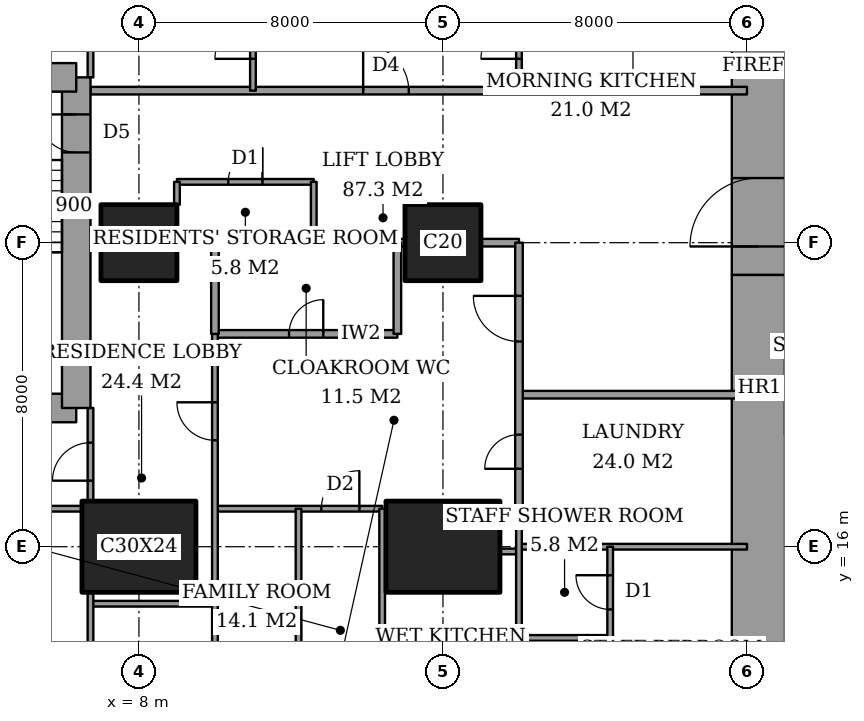
"""IFC4 building model, lengths in metres.
Left out: names, types, materials, properties, quantities, classifications, styles, units other than length and angle.
Written with IfcOpenShell. Run it as: python <this file> out.ifc"""

import sys

from ifc_helpers import new_model, si_unit, direction, frame, frame_2d, origin, origin_2d, place, context, subcontext, project, spatial, rectangle, extrude, element, fill, save


model = new_model("IFC4")
c1 = context("Model", 3, precision=1e-05, world=origin(), true_north=direction((0.0, 1.0)))
c2 = subcontext(c1, "Body", "Model", "MODEL_VIEW")
j1 = project(units=[si_unit("LENGTHUNIT", "METRE"), si_unit("PLANEANGLEUNIT", "RADIAN")], contexts=[c1])
p1 = place(None, origin())
s1 = spatial("IfcSite", under=j1, at=p1, CompositionType="ELEMENT")
p2 = place(p1, origin())
s2 = spatial("IfcBuilding", under=s1, at=p2, CompositionType="ELEMENT")
p3 = place(p2, frame((0.0, 0.0, 125.0)))
s3 = spatial("IfcBuildingStorey", under=s2, at=p3, CompositionType="ELEMENT", Elevation=125.0)
p4 = place(p3, frame((8.0, 16.0, 0.0), z_axis=(0.0, 0.0, 1.0), x_axis=(1.0, 0.0, 0.0)))
e1 = element("IfcColumn", 1, at=p4, inside=s3, PredefinedType="COLUMN", context=c2, shape_type="SweptSolid", body=[
    extrude(rectangle(XDim=3.0, YDim=2.4, at=origin_2d()), origin(), (0.0, 0.0, 1.0), 3.6),
])
p5 = place(p3, frame((8.0, 24.0, 0.0), z_axis=(0.0, 0.0, 1.0), x_axis=(1.0, 0.0, 0.0)))
e2 = element("IfcColumn", 2, at=p5, inside=s3, PredefinedType="COLUMN", context=c2, shape_type="SweptSolid", body=[
    extrude(rectangle(XDim=2.0, YDim=2.0, at=origin_2d()), origin(), (0.0, 0.0, 1.0), 3.6),
])
p6 = place(p3, frame((16.0, 16.0, 0.0), z_axis=(0.0, 0.0, 1.0), x_axis=(1.0, 0.0, 0.0)))
e3 = element("IfcColumn", 3, at=p6, inside=s3, PredefinedType="COLUMN", context=c2, shape_type="SweptSolid", body=[
    extrude(rectangle(XDim=3.0, YDim=2.4, at=origin_2d()), origin(), (0.0, 0.0, 1.0), 3.6),
])
p7 = place(p3, frame((16.0, 24.0, 0.0), z_axis=(0.0, 0.0, 1.0), x_axis=(1.0, 0.0, 0.0)))
e4 = element("IfcColumn", 4, at=p7, inside=s3, PredefinedType="COLUMN", context=c2, shape_type="SweptSolid", body=[
    extrude(rectangle(XDim=2.0, YDim=2.0, at=origin_2d()), origin(), (0.0, 0.0, 1.0), 3.6),
])
p8 = place(p3, frame((24.3, 13.0, 0.0), z_axis=(0.0, 0.0, 1.0), x_axis=(0.0, 1.0, 0.0)))
e5 = element("IfcWall", 5, at=p8, inside=s3, PredefinedType="SHEAR", context=c2, shape_type="SweptSolid", body=[
    extrude(rectangle(XDim=10.15, YDim=1.4, at=frame_2d((5.075, 0.0))), origin(), (0.0, 0.0, 1.0), 3.6),
])
p9 = place(p3, frame((24.3, 23.15, 0.0), z_axis=(0.0, 0.0, 1.0), x_axis=(0.0, 1.0, 0.0)))
e6 = element("IfcWall", 6, at=p9, inside=s3, PredefinedType="SHEAR", context=c2, shape_type="SweptSolid", body=[
    extrude(rectangle(XDim=11.85, YDim=1.4, at=frame_2d((5.925, 0.0))), origin(), (0.0, 0.0, 1.0), 3.6),
])
p10 = place(p9, frame((0.75, 0.0, 0.0)))
e7 = element("IfcOpeningElement", 7, at=p10, cuts=e6, PredefinedType="OPENING", context=c2, shape_type="SweptSolid", body=[
    extrude(rectangle(XDim=1.8, YDim=2.4, at=frame_2d((0.9, 1.2))), frame((0.0, 0.71, 0.0), z_axis=(0.0, -1.0, 0.0), x_axis=(1.0, 0.0, 0.0)), (0.0, 0.0, 1.0), 1.42),
])
p11 = place(p3, frame((1.9, 19.65, 0.0), z_axis=(0.0, 0.0, 1.0), x_axis=(1.0, 0.0, 0.0)))
e8 = element("IfcWall", 8, at=p11, inside=s3, PredefinedType="SHEAR", context=c2, shape_type="SweptSolid", body=[
    extrude(rectangle(XDim=4.45, YDim=0.75, at=frame_2d((2.225, 0.0))), origin(), (0.0, 0.0, 1.0), 3.6),
])
p12 = place(p3, frame((6.35, 19.65, 0.0), z_axis=(0.0, 0.0, 1.0), x_axis=(0.0, 1.0, 0.0)))
e9 = element("IfcWall", 9, at=p12, inside=s3, PredefinedType="SHEAR", context=c2, shape_type="SweptSolid", body=[
    extrude(rectangle(XDim=8.7, YDim=0.75, at=frame_2d((4.35, 0.0))), origin(), (0.0, 0.0, 1.0), 3.6),
])
p13 = place(p12, frame((6.725, 0.0, 0.0)))
e10 = element("IfcOpeningElement", 10, at=p13, cuts=e9, PredefinedType="OPENING", context=c2, shape_type="SweptSolid", body=[
    extrude(rectangle(XDim=1.0, YDim=2.1, at=frame_2d((0.5, 1.05))), frame((0.0, 0.385, 0.0), z_axis=(0.0, -1.0, 0.0), x_axis=(1.0, 0.0, 0.0)), (0.0, 0.0, 1.0), 0.77),
])
p14 = place(p3, frame((6.35, 28.35, 0.0), z_axis=(0.0, 0.0, 1.0), x_axis=(-1.0, 0.0, 0.0)))
e11 = element("IfcWall", 11, at=p14, inside=s3, PredefinedType="SHEAR", context=c2, shape_type="SweptSolid", body=[
    extrude(rectangle(XDim=4.45, YDim=0.75, at=frame_2d((2.225, 0.0))), origin(), (0.0, 0.0, 1.0), 3.6),
])
p15 = place(p3, frame((18.0, 13.6, 0.0), z_axis=(0.0, 0.0, 1.0), x_axis=(1.0, 0.0, 0.0)))
e12 = element("IfcWall", 12, at=p15, inside=s3, PredefinedType="PARTITIONING", context=c2, shape_type="SweptSolid", body=[
    extrude(rectangle(XDim=2.4, YDim=0.15, at=frame_2d((1.2, 0.0))), origin(), (0.0, 0.0, 1.0), 3.35),
])
p16 = place(p3, frame((6.725, 14.5, 0.0), z_axis=(0.0, 0.0, 1.0), x_axis=(1.0, 0.0, 0.0)))
e13 = element("IfcWall", 13, at=p16, inside=s3, PredefinedType="PARTITIONING", context=c2, shape_type="SweptSolid", body=[
    extrude(rectangle(XDim=3.275, YDim=0.15, at=frame_2d((1.637, 0.0))), origin(), (0.0, 0.0, 1.0), 3.35),
])
p17 = place(p3, frame((17.5, 15.875, 0.0), z_axis=(0.0, 0.0, 1.0), x_axis=(1.0, 0.0, 0.0)))
e14 = element("IfcWall", 14, at=p17, inside=s3, PredefinedType="PARTITIONING", context=c2, shape_type="SweptSolid", body=[
    extrude(rectangle(XDim=0.5, YDim=0.15, at=frame_2d((0.25, 0.0))), origin(), (0.0, 0.0, 1.0), 2.634),
])
p18 = place(p3, frame((18.0, 16.0, 0.0), z_axis=(0.0, 0.0, 1.0), x_axis=(1.0, 0.0, 0.0)))
e15 = element("IfcWall", 15, at=p18, inside=s3, PredefinedType="PARTITIONING", context=c2, shape_type="SweptSolid", body=[
    extrude(rectangle(XDim=6.0, YDim=0.15, at=frame_2d((3.0, 0.0))), origin(), (0.0, 0.0, 1.0), 2.634),
])
p19 = place(p3, frame((1.35, 17.0, 0.0), z_axis=(0.0, 0.0, 1.0), x_axis=(1.0, 0.0, 0.0)))
e16 = element("IfcWall", 16, at=p19, inside=s3, PredefinedType="PARTITIONING", context=c2, shape_type="SweptSolid", body=[
    extrude(rectangle(XDim=5.15, YDim=0.15, at=frame_2d((2.575, 0.0))), origin(), (0.0, 0.0, 1.0), 3.35),
])
p20 = place(p3, frame((10.0, 17.0, 0.0), z_axis=(0.0, 0.0, 1.0), x_axis=(1.0, 0.0, 0.0)))
e17 = element("IfcWall", 17, at=p20, inside=s3, PredefinedType="PARTITIONING", context=c2, shape_type="SweptSolid", body=[
    extrude(rectangle(XDim=4.4, YDim=0.15, at=frame_2d((2.2, 0.0))), origin(), (0.0, 0.0, 1.0), 3.35),
])
p21 = place(p20, frame((2.8, 0.0, 0.0)))
e18 = element("IfcOpeningElement", 18, at=p21, cuts=e17, PredefinedType="OPENING", context=c2, shape_type="SweptSolid", body=[
    extrude(rectangle(XDim=1.0, YDim=2.1, at=frame_2d((0.5, 1.05))), frame((0.0, 0.085, 0.0), z_axis=(0.0, -1.0, 0.0), x_axis=(1.0, 0.0, 0.0)), (0.0, 0.0, 1.0), 0.17),
])
p22 = place(p3, frame((18.0, 20.0, 0.0), z_axis=(0.0, 0.0, 1.0), x_axis=(1.0, 0.0, 0.0)))
e19 = element("IfcWall", 19, at=p22, inside=s3, PredefinedType="PARTITIONING", context=c2, shape_type="SweptSolid", body=[
    extrude(rectangle(XDim=6.0, YDim=0.2, at=frame_2d((3.0, 0.0))), origin(), (0.0, 0.0, 1.0), 3.35),
])
p23 = place(p3, frame((10.0, 21.6, 0.0), z_axis=(0.0, 0.0, 1.0), x_axis=(1.0, 0.0, 0.0)))
e20 = element("IfcWall", 20, at=p23, inside=s3, PredefinedType="PARTITIONING", context=c2, shape_type="SweptSolid", body=[
    extrude(rectangle(XDim=4.8, YDim=0.2, at=frame_2d((2.4, 0.0))), origin(), (0.0, 0.0, 1.0), 3.35),
])
p24 = place(p23, frame((1.95, 0.0, 0.0)))
e21 = element("IfcOpeningElement", 21, at=p24, cuts=e20, PredefinedType="OPENING", context=c2, shape_type="SweptSolid", body=[
    extrude(rectangle(XDim=0.9, YDim=2.1, at=frame_2d((0.45, 1.05))), frame((0.0, 0.11, 0.0), z_axis=(0.0, -1.0, 0.0), x_axis=(1.0, 0.0, 0.0)), (0.0, 0.0, 1.0), 0.22),
])
p25 = place(p3, frame((9.0, 24.0, 0.0), z_axis=(0.0, 0.0, 1.0), x_axis=(1.0, 0.0, 0.0)))
e22 = element("IfcWall", 22, at=p25, inside=s3, PredefinedType="PARTITIONING", context=c2, shape_type="SweptSolid", body=[
    extrude(rectangle(XDim=6.0, YDim=0.2, at=frame_2d((3.0, 0.0))), origin(), (0.0, 0.0, 1.0), 3.35),
])
p26 = place(p3, frame((17.0, 24.0, 0.0), z_axis=(0.0, 0.0, 1.0), x_axis=(1.0, 0.0, 0.0)))
e23 = element("IfcWall", 23, at=p26, inside=s3, PredefinedType="PARTITIONING", context=c2, shape_type="SweptSolid", body=[
    extrude(rectangle(XDim=1.0, YDim=0.2, at=frame_2d((0.5, 0.0))), origin(), (0.0, 0.0, 1.0), 3.35),
])
p27 = place(p3, frame((9.0, 25.6, 0.0), z_axis=(0.0, 0.0, 1.0), x_axis=(1.0, 0.0, 0.0)))
e24 = element("IfcWall", 24, at=p27, inside=s3, PredefinedType="PARTITIONING", context=c2, shape_type="SweptSolid", body=[
    extrude(rectangle(XDim=3.6, YDim=0.15, at=frame_2d((1.8, 0.0))), origin(), (0.0, 0.0, 1.0), 3.35),
])
p28 = place(p27, frame((1.35, 0.0, 0.0)))
e25 = element("IfcOpeningElement", 25, at=p28, cuts=e24, PredefinedType="OPENING", context=c2, shape_type="SweptSolid", body=[
    extrude(rectangle(XDim=0.9, YDim=2.1, at=frame_2d((0.45, 1.05))), frame((0.0, 0.085, 0.0), z_axis=(0.0, -1.0, 0.0), x_axis=(1.0, 0.0, 0.0)), (0.0, 0.0, 1.0), 0.17),
])
p29 = place(p3, frame((6.725, 28.0, 0.0), z_axis=(0.0, 0.0, 1.0), x_axis=(1.0, 0.0, 0.0)))
e26 = element("IfcWall", 26, at=p29, inside=s3, PredefinedType="PARTITIONING", context=c2, shape_type="SweptSolid", body=[
    extrude(rectangle(XDim=17.275, YDim=0.2, at=frame_2d((8.637, 0.0))), origin(), (0.0, 0.0, 1.0), 3.35),
])
p30 = place(p29, frame((7.175, 0.0, 0.0)))
e27 = element("IfcOpeningElement", 27, at=p30, cuts=e26, PredefinedType="OPENING", context=c2, shape_type="SweptSolid", body=[
    extrude(rectangle(XDim=1.2, YDim=2.4, at=frame_2d((0.6, 1.2))), frame((0.0, 0.11, 0.0), z_axis=(0.0, -1.0, 0.0), x_axis=(1.0, 0.0, 0.0)), (0.0, 0.0, 1.0), 0.22),
])
p31 = place(p3, frame((6.725, 10.6, 0.0), z_axis=(0.0, 0.0, 1.0), x_axis=(0.0, 1.0, 0.0)))
e28 = element("IfcWall", 28, at=p31, inside=s3, PredefinedType="PARTITIONING", context=c2, shape_type="SweptSolid", body=[
    extrude(rectangle(XDim=4.2, YDim=0.15, at=frame_2d((2.1, 0.0))), origin(), (0.0, 0.0, 1.0), 3.35),
])
p32 = place(p3, frame((6.725, 17.2, 0.0), z_axis=(0.0, 0.0, 1.0), x_axis=(0.0, 1.0, 0.0)))
e29 = element("IfcWall", 29, at=p32, inside=s3, PredefinedType="PARTITIONING", context=c2, shape_type="SweptSolid", body=[
    extrude(rectangle(XDim=2.45, YDim=0.15, at=frame_2d((1.225, 0.0))), origin(), (0.0, 0.0, 1.0), 3.35),
])
p33 = place(p32, frame((0.538, 0.0, 0.0)))
e30 = element("IfcOpeningElement", 30, at=p33, cuts=e29, PredefinedType="OPENING", context=c2, shape_type="SweptSolid", body=[
    extrude(rectangle(XDim=1.0, YDim=2.1, at=frame_2d((0.5, 1.05))), frame((0.0, 0.085, 0.0), z_axis=(0.0, -1.0, 0.0), x_axis=(1.0, 0.0, 0.0)), (0.0, 0.0, 1.0), 0.17),
])
p34 = place(p3, frame((6.725, 28.35, 0.0), z_axis=(0.0, 0.0, 1.0), x_axis=(0.0, 1.0, 0.0)))
e31 = element("IfcWall", 31, at=p34, inside=s3, PredefinedType="PARTITIONING", context=c2, shape_type="SweptSolid", body=[
    extrude(rectangle(XDim=2.45, YDim=0.15, at=frame_2d((1.225, 0.0))), origin(), (0.0, 0.0, 1.0), 3.35),
])
p35 = place(p34, frame((0.913, 0.0, 0.0)))
e32 = element("IfcOpeningElement", 32, at=p35, cuts=e31, PredefinedType="OPENING", context=c2, shape_type="SweptSolid", body=[
    extrude(rectangle(XDim=1.0, YDim=2.1, at=frame_2d((0.5, 1.05))), frame((0.0, 0.085, 0.0), z_axis=(0.0, -1.0, 0.0), x_axis=(1.0, 0.0, 0.0)), (0.0, 0.0, 1.0), 0.17),
])
p36 = place(p3, frame((9.0, 25.0, 0.0), z_axis=(0.0, 0.0, 1.0), x_axis=(0.0, 1.0, 0.0)))
e33 = element("IfcWall", 33, at=p36, inside=s3, PredefinedType="PARTITIONING", context=c2, shape_type="SweptSolid", body=[
    extrude(rectangle(XDim=0.6, YDim=0.15, at=frame_2d((0.3, 0.0))), origin(), (0.0, 0.0, 1.0), 3.35),
])
p37 = place(p3, frame((10.0, 21.6, 0.0), z_axis=(0.0, 0.0, 1.0), x_axis=(0.0, 1.0, 0.0)))
e34 = element("IfcWall", 34, at=p37, inside=s3, PredefinedType="PARTITIONING", context=c2, shape_type="SweptSolid", body=[
    extrude(rectangle(XDim=2.4, YDim=0.2, at=frame_2d((1.2, 0.0))), origin(), (0.0, 0.0, 1.0), 3.35),
])
p38 = place(p3, frame((10.0, 10.6, 0.0), z_axis=(0.0, 0.0, 1.0), x_axis=(0.0, 1.0, 0.0)))
e35 = element("IfcWall", 35, at=p38, inside=s3, PredefinedType="PARTITIONING", context=c2, shape_type="SweptSolid", body=[
    extrude(rectangle(XDim=11.0, YDim=0.15, at=frame_2d((5.5, 0.0))), origin(), (0.0, 0.0, 1.0), 3.35),
])
p39 = place(p38, frame((8.2, 0.0, 0.0)))
e36 = element("IfcOpeningElement", 36, at=p39, cuts=e35, PredefinedType="OPENING", context=c2, shape_type="SweptSolid", body=[
    extrude(rectangle(XDim=1.0, YDim=2.1, at=frame_2d((0.5, 1.05))), frame((0.0, 0.085, 0.0), z_axis=(0.0, -1.0, 0.0), x_axis=(1.0, 0.0, 0.0)), (0.0, 0.0, 1.0), 0.17),
])
p40 = place(p3, frame((11.0, 28.0, 0.0), z_axis=(0.0, 0.0, 1.0), x_axis=(0.0, 1.0, 0.0)))
e37 = element("IfcWall", 37, at=p40, inside=s3, PredefinedType="PARTITIONING", context=c2, shape_type="SweptSolid", body=[
    extrude(rectangle(XDim=9.2, YDim=0.15, at=frame_2d((4.6, 0.0))), origin(), (0.0, 0.0, 1.0), 3.35),
])
p41 = place(p40, frame((0.837, 0.0, 0.0)))
e38 = element("IfcOpeningElement", 38, at=p41, cuts=e37, PredefinedType="OPENING", context=c2, shape_type="SweptSolid", body=[
    extrude(rectangle(XDim=1.0, YDim=2.1, at=frame_2d((0.5, 1.05))), frame((0.0, 0.085, 0.0), z_axis=(0.0, -1.0, 0.0), x_axis=(1.0, 0.0, 0.0)), (0.0, 0.0, 1.0), 0.17),
])
p42 = place(p3, frame((12.2, 10.6, 0.0), z_axis=(0.0, 0.0, 1.0), x_axis=(0.0, 1.0, 0.0)))
e39 = element("IfcWall", 39, at=p42, inside=s3, PredefinedType="PARTITIONING", context=c2, shape_type="SweptSolid", body=[
    extrude(rectangle(XDim=6.4, YDim=0.15, at=frame_2d((3.2, 0.0))), origin(), (0.0, 0.0, 1.0), 3.35),
])
p43 = place(p3, frame((12.6, 24.0, 0.0), z_axis=(0.0, 0.0, 1.0), x_axis=(0.0, 1.0, 0.0)))
e40 = element("IfcWall", 40, at=p43, inside=s3, PredefinedType="PARTITIONING", context=c2, shape_type="SweptSolid", body=[
    extrude(rectangle(XDim=1.6, YDim=0.15, at=frame_2d((0.8, 0.0))), origin(), (0.0, 0.0, 1.0), 3.35),
])
p44 = place(p3, frame((14.4, 10.6, 0.0), z_axis=(0.0, 0.0, 1.0), x_axis=(0.0, 1.0, 0.0)))
e41 = element("IfcWall", 41, at=p44, inside=s3, PredefinedType="PARTITIONING", context=c2, shape_type="SweptSolid", body=[
    extrude(rectangle(XDim=6.4, YDim=0.15, at=frame_2d((3.2, 0.0))), origin(), (0.0, 0.0, 1.0), 3.35),
])
p45 = place(p3, frame((14.8, 21.6, 0.0), z_axis=(0.0, 0.0, 1.0), x_axis=(0.0, 1.0, 0.0)))
e42 = element("IfcWall", 42, at=p45, inside=s3, PredefinedType="PARTITIONING", context=c2, shape_type="SweptSolid", body=[
    extrude(rectangle(XDim=2.4, YDim=0.2, at=frame_2d((1.2, 0.0))), origin(), (0.0, 0.0, 1.0), 3.35),
])
p46 = place(p3, frame((18.0, 17.0, 0.0), z_axis=(0.0, 0.0, 1.0), x_axis=(0.0, 1.0, 0.0)))
e43 = element("IfcWall", 43, at=p46, inside=s3, PredefinedType="PARTITIONING", context=c2, shape_type="SweptSolid", body=[
    extrude(rectangle(XDim=7.0, YDim=0.2, at=frame_2d((3.5, 0.0))), origin(), (0.0, 0.0, 1.0), 3.35),
])
p47 = place(p46, frame((4.4, 0.0, 0.0)))
e44 = element("IfcOpeningElement", 44, at=p47, cuts=e43, PredefinedType="OPENING", context=c2, shape_type="SweptSolid", body=[
    extrude(rectangle(XDim=1.2, YDim=2.4, at=frame_2d((0.6, 1.2))), frame((0.0, 0.11, 0.0), z_axis=(0.0, -1.0, 0.0), x_axis=(1.0, 0.0, 0.0)), (0.0, 0.0, 1.0), 0.22),
])
p48 = place(p46, frame((1.05, 0.0, 0.0)))
e45 = element("IfcOpeningElement", 45, at=p48, cuts=e43, PredefinedType="OPENING", context=c2, shape_type="SweptSolid", body=[
    extrude(rectangle(XDim=0.9, YDim=2.1, at=frame_2d((0.45, 1.05))), frame((0.0, 0.11, 0.0), z_axis=(0.0, -1.0, 0.0), x_axis=(1.0, 0.0, 0.0)), (0.0, 0.0, 1.0), 0.22),
])
p49 = place(p3, frame((18.0, 10.6, 0.0), z_axis=(0.0, 0.0, 1.0), x_axis=(0.0, 1.0, 0.0)))
e46 = element("IfcWall", 46, at=p49, inside=s3, PredefinedType="PARTITIONING", context=c2, shape_type="SweptSolid", body=[
    extrude(rectangle(XDim=6.4, YDim=0.15, at=frame_2d((3.2, 0.0))), origin(), (0.0, 0.0, 1.0), 3.35),
])
p50 = place(p3, frame((18.0, 28.0, 0.0), z_axis=(0.0, 0.0, 1.0), x_axis=(0.0, 1.0, 0.0)))
e47 = element("IfcWall", 47, at=p50, inside=s3, PredefinedType="PARTITIONING", context=c2, shape_type="SweptSolid", body=[
    extrude(rectangle(XDim=9.2, YDim=0.15, at=frame_2d((4.6, 0.0))), origin(), (0.0, 0.0, 1.0), 3.35),
])
p51 = place(p50, frame((0.837, 0.0, 0.0)))
e48 = element("IfcOpeningElement", 48, at=p51, cuts=e47, PredefinedType="OPENING", context=c2, shape_type="SweptSolid", body=[
    extrude(rectangle(XDim=1.0, YDim=2.1, at=frame_2d((0.5, 1.05))), frame((0.0, 0.085, 0.0), z_axis=(0.0, -1.0, 0.0), x_axis=(1.0, 0.0, 0.0)), (0.0, 0.0, 1.0), 0.17),
])
p52 = place(p3, frame((20.4, 13.6, 0.0), z_axis=(0.0, 0.0, 1.0), x_axis=(0.0, 1.0, 0.0)))
e49 = element("IfcWall", 49, at=p52, inside=s3, PredefinedType="PARTITIONING", context=c2, shape_type="SweptSolid", body=[
    extrude(rectangle(XDim=2.4, YDim=0.15, at=frame_2d((1.2, 0.0))), origin(), (0.0, 0.0, 1.0), 3.35),
])
p53 = place(p52, frame((0.75, 0.0, 0.0)))
e50 = element("IfcOpeningElement", 50, at=p53, cuts=e49, PredefinedType="OPENING", context=c2, shape_type="SweptSolid", body=[
    extrude(rectangle(XDim=0.9, YDim=2.1, at=frame_2d((0.45, 1.05))), frame((0.0, 0.085, 0.0), z_axis=(0.0, -1.0, 0.0), x_axis=(1.0, 0.0, 0.0)), (0.0, 0.0, 1.0), 0.17),
])
p54 = place(p33, origin())
e51 = element("IfcDoor", 51, at=p54, inside=s3, OperationType="SINGLE_SWING_RIGHT", PredefinedType="DOOR", context=c2, shape_type="SweptSolid", body=[
    extrude(rectangle(XDim=1.0, YDim=2.1, at=frame_2d((0.5, 1.05))), frame((0.0, 0.025, 0.0), z_axis=(0.0, -1.0, 0.0), x_axis=(1.0, 0.0, 0.0)), (0.0, 0.0, 1.0), 0.05),
])
fill(e30, e51)
p55 = place(p39, origin())
e52 = element("IfcDoor", 52, at=p55, inside=s3, OperationType="SINGLE_SWING_LEFT", PredefinedType="DOOR", context=c2, shape_type="SweptSolid", body=[
    extrude(rectangle(XDim=1.0, YDim=2.1, at=frame_2d((0.5, 1.05))), frame((0.0, 0.025, 0.0), z_axis=(0.0, -1.0, 0.0), x_axis=(1.0, 0.0, 0.0)), (0.0, 0.0, 1.0), 0.05),
])
fill(e36, e52)
p56 = place(p24, origin())
e53 = element("IfcDoor", 53, at=p56, inside=s3, OperationType="SINGLE_SWING_LEFT", PredefinedType="DOOR", context=c2, shape_type="SweptSolid", body=[
    extrude(rectangle(XDim=0.9, YDim=2.1, at=frame_2d((0.45, 1.05))), frame((0.0, 0.025, 0.0), z_axis=(0.0, -1.0, 0.0), x_axis=(1.0, 0.0, 0.0)), (0.0, 0.0, 1.0), 0.05),
])
fill(e21, e53)
p57 = place(p47, origin())
e54 = element("IfcDoor", 54, at=p57, inside=s3, OperationType="SINGLE_SWING_LEFT", PredefinedType="DOOR", context=c2, shape_type="SweptSolid", body=[
    extrude(rectangle(XDim=1.2, YDim=2.4, at=frame_2d((0.6, 1.2))), frame((0.0, 0.025, 0.0), z_axis=(0.0, -1.0, 0.0), x_axis=(1.0, 0.0, 0.0)), (0.0, 0.0, 1.0), 0.05),
])
fill(e44, e54)
p58 = place(p21, origin())
e55 = element("IfcDoor", 55, at=p58, inside=s3, OperationType="SINGLE_SWING_LEFT", PredefinedType="DOOR", context=c2, shape_type="SweptSolid", body=[
    extrude(rectangle(XDim=1.0, YDim=2.1, at=frame_2d((0.5, 1.05))), frame((0.0, 0.025, 0.0), z_axis=(0.0, -1.0, 0.0), x_axis=(1.0, 0.0, 0.0)), (0.0, 0.0, 1.0), 0.05),
])
fill(e18, e55)
p59 = place(p53, origin())
e56 = element("IfcDoor", 56, at=p59, inside=s3, OperationType="SINGLE_SWING_LEFT", PredefinedType="DOOR", context=c2, shape_type="SweptSolid", body=[
    extrude(rectangle(XDim=0.9, YDim=2.1, at=frame_2d((0.45, 1.05))), frame((0.0, 0.025, 0.0), z_axis=(0.0, -1.0, 0.0), x_axis=(1.0, 0.0, 0.0)), (0.0, 0.0, 1.0), 0.05),
])
fill(e50, e56)
p60 = place(p48, origin())
e57 = element("IfcDoor", 57, at=p60, inside=s3, OperationType="SINGLE_SWING_RIGHT", PredefinedType="DOOR", context=c2, shape_type="SweptSolid", body=[
    extrude(rectangle(XDim=0.9, YDim=2.1, at=frame_2d((0.45, 1.05))), frame((0.0, 0.025, 0.0), z_axis=(0.0, -1.0, 0.0), x_axis=(1.0, 0.0, 0.0)), (0.0, 0.0, 1.0), 0.05),
])
fill(e45, e57)
p61 = place(p41, origin())
e58 = element("IfcDoor", 58, at=p61, inside=s3, OperationType="SINGLE_SWING_RIGHT", PredefinedType="DOOR", context=c2, shape_type="SweptSolid", body=[
    extrude(rectangle(XDim=1.0, YDim=2.1, at=frame_2d((0.5, 1.05))), frame((0.0, 0.025, 0.0), z_axis=(0.0, -1.0, 0.0), x_axis=(1.0, 0.0, 0.0)), (0.0, 0.0, 1.0), 0.05),
])
fill(e38, e58)
p62 = place(p30, origin())
e59 = element("IfcDoor", 59, at=p62, inside=s3, OperationType="SINGLE_SWING_RIGHT", PredefinedType="DOOR", context=c2, shape_type="SweptSolid", body=[
    extrude(rectangle(XDim=1.2, YDim=2.4, at=frame_2d((0.6, 1.2))), frame((0.0, 0.025, 0.0), z_axis=(0.0, -1.0, 0.0), x_axis=(1.0, 0.0, 0.0)), (0.0, 0.0, 1.0), 0.05),
])
fill(e27, e59)
p63 = place(p51, origin())
e60 = element("IfcDoor", 60, at=p63, inside=s3, OperationType="SINGLE_SWING_RIGHT", PredefinedType="DOOR", context=c2, shape_type="SweptSolid", body=[
    extrude(rectangle(XDim=1.0, YDim=2.1, at=frame_2d((0.5, 1.05))), frame((0.0, 0.025, 0.0), z_axis=(0.0, -1.0, 0.0), x_axis=(1.0, 0.0, 0.0)), (0.0, 0.0, 1.0), 0.05),
])
fill(e48, e60)
p64 = place(p28, origin())
e61 = element("IfcDoor", 61, at=p64, inside=s3, OperationType="SINGLE_SWING_LEFT", PredefinedType="DOOR", context=c2, shape_type="SweptSolid", body=[
    extrude(rectangle(XDim=0.9, YDim=2.1, at=frame_2d((0.45, 1.05))), frame((0.0, 0.025, 0.0), z_axis=(0.0, -1.0, 0.0), x_axis=(1.0, 0.0, 0.0)), (0.0, 0.0, 1.0), 0.05),
])
fill(e25, e61)
p65 = place(p10, origin())
e62 = element("IfcDoor", 62, at=p65, inside=s3, OperationType="DOUBLE_DOOR_DOUBLE_SWING", PredefinedType="DOOR", context=c2, shape_type="SweptSolid", body=[
    extrude(rectangle(XDim=1.8, YDim=2.4, at=frame_2d((0.9, 1.2))), frame((0.0, 0.025, 0.0), z_axis=(0.0, -1.0, 0.0), x_axis=(1.0, 0.0, 0.0)), (0.0, 0.0, 1.0), 0.05),
])
fill(e7, e62)
p66 = place(p13, origin())
e63 = element("IfcDoor", 63, at=p66, inside=s3, OperationType="SINGLE_SWING_LEFT", PredefinedType="DOOR", context=c2, shape_type="SweptSolid", body=[
    extrude(rectangle(XDim=1.0, YDim=2.1, at=frame_2d((0.5, 1.05))), frame((0.0, 0.025, 0.0), z_axis=(0.0, -1.0, 0.0), x_axis=(1.0, 0.0, 0.0)), (0.0, 0.0, 1.0), 0.05),
])
fill(e10, e63)
save(model, sys.argv[1])
